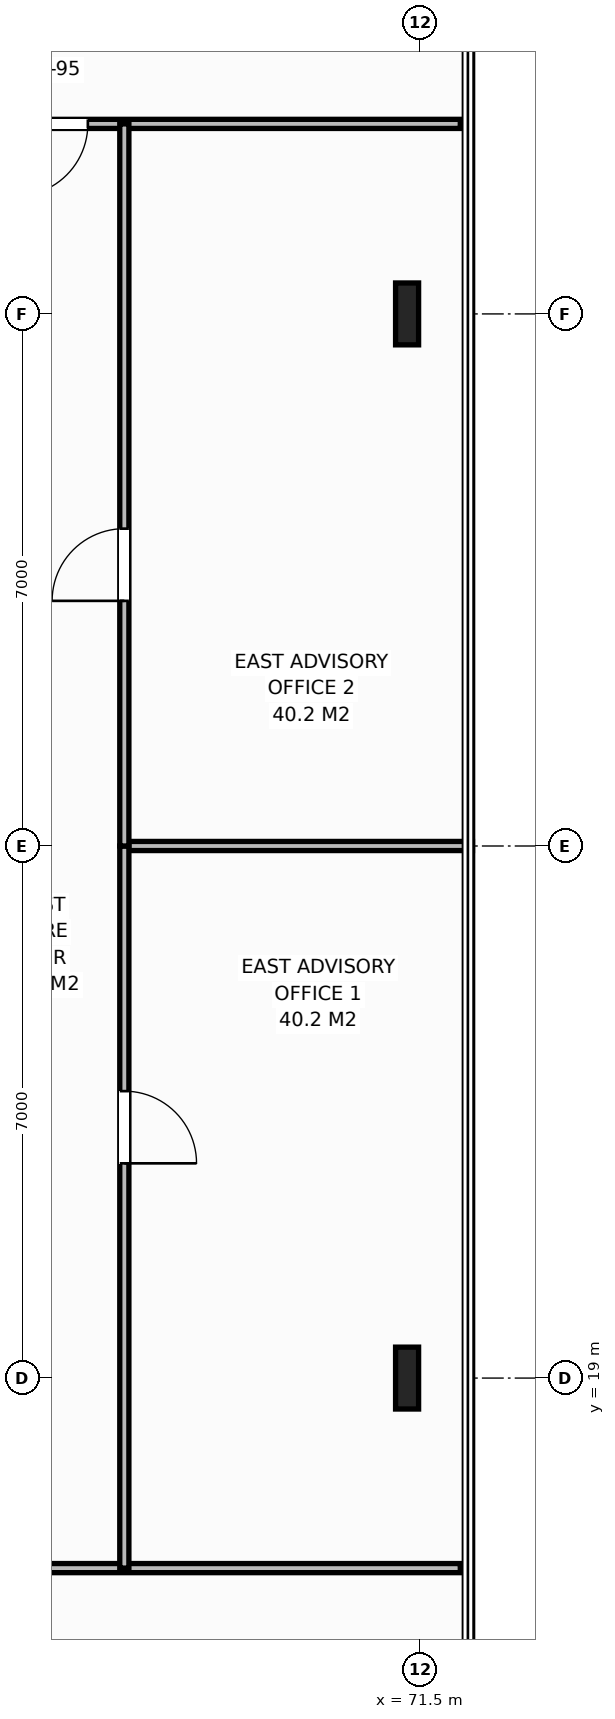
"""IFC4 building model, lengths in metres.
Left out: names, types, materials, properties, quantities, classifications, styles, units other than length and angle.
Written with IfcOpenShell. Run it as: python <this file> out.ifc"""

import sys

from ifc_helpers import new_model, si_unit, direction, frame, frame_2d, origin, origin_2d, place, context, subcontext, project, spatial, rectangle, i_section, extrude, element, fill, save


model = new_model("IFC4")
c1 = context("Model", 3, precision=1e-05, world=origin(), true_north=direction((0.0, 1.0)))
c2 = subcontext(c1, "Body", "Model", "MODEL_VIEW")
j1 = project(units=[si_unit("LENGTHUNIT", "METRE"), si_unit("PLANEANGLEUNIT", "RADIAN")], contexts=[c1])
p1 = place(None, origin())
s1 = spatial("IfcSite", under=j1, at=p1, CompositionType="ELEMENT")
p2 = place(p1, origin())
s2 = spatial("IfcBuilding", under=s1, at=p2, CompositionType="ELEMENT")
p3 = place(p2, frame((0.0, 0.0, 202.4)))
s3 = spatial("IfcBuildingStorey", under=s2, at=p3, CompositionType="ELEMENT", Elevation=202.4)
for number, where, z_axis, x_axis in (
    (1, (71.32, 19.0, 0.0), (0.0, 0.0, 1.0), (1.0, 0.0, 0.0)),
    (2, (71.32, 33.0, 0.0), (0.0, 0.0, 1.0), (1.0, 0.0, 0.0)),
):
    element("IfcColumn", number, at=place(p3, frame(where, z_axis=z_axis, x_axis=x_axis)), inside=s3, PredefinedType="COLUMN", context=c2, shape_type="SweptSolid", body=[
        extrude(i_section(OverallWidth=0.303, OverallDepth=0.814, WebThickness=0.021, FlangeThickness=0.04, at=origin_2d()), origin(), (0.0, 0.0, 1.0), 3.8),
    ])
p4 = place(p3, frame((64.86, 35.5, 0.0), z_axis=(0.0, 0.0, 1.0), x_axis=(1.0, 0.0, 0.0)))
e3 = element("IfcWall", 3, at=p4, inside=s3, PredefinedType="PARTITIONING", context=c2, shape_type="SweptSolid", body=[
    extrude(rectangle(XDim=7.16, YDim=0.12, at=frame_2d((3.58, 0.0))), origin(), (0.0, 0.0, 1.0), 3.58),
])
p5 = place(p4, frame((1.31, 0.0, 0.0)))
e4 = element("IfcOpeningElement", 4, at=p5, cuts=e3, PredefinedType="OPENING", context=c2, shape_type="SweptSolid", body=[
    extrude(rectangle(XDim=0.95, YDim=2.15, at=frame_2d((0.475, 1.075))), frame((0.0, 0.07, 0.0), z_axis=(0.0, -1.0, 0.0), x_axis=(1.0, 0.0, 0.0)), (0.0, 0.0, 1.0), 0.14),
])
p6 = place(p3, frame((58.377, 16.5, 0.0), z_axis=(0.0, 0.0, 1.0), x_axis=(1.0, 0.0, 0.0)))
e5 = element("IfcWall", 5, at=p6, inside=s3, PredefinedType="PARTITIONING", context=c2, shape_type="SweptSolid", body=[
    extrude(rectangle(XDim=13.643, YDim=0.12, at=frame_2d((6.822, 0.0))), origin(), (0.0, 0.0, 1.0), 3.58),
])
p7 = place(p6, frame((4.137, 0.0, 0.0)))
e6 = element("IfcOpeningElement", 6, at=p7, cuts=e5, PredefinedType="OPENING", context=c2, shape_type="SweptSolid", body=[
    extrude(rectangle(XDim=0.95, YDim=2.15, at=frame_2d((0.475, 1.075))), frame((0.0, 0.07, 0.0), z_axis=(0.0, -1.0, 0.0), x_axis=(1.0, 0.0, 0.0)), (0.0, 0.0, 1.0), 0.14),
])
p8 = place(p3, frame((67.6, 26.0, 0.0), z_axis=(0.0, 0.0, 1.0), x_axis=(1.0, 0.0, 0.0)))
e7 = element("IfcWall", 7, at=p8, inside=s3, PredefinedType="PARTITIONING", context=c2, shape_type="SweptSolid", body=[
    extrude(rectangle(XDim=4.58, YDim=0.12, at=frame_2d((2.29, 0.0))), origin(), (0.0, 0.0, 1.0), 3.58),
])
p9 = place(p3, frame((67.6, 16.5, 0.0), z_axis=(0.0, 0.0, 1.0), x_axis=(0.0, 1.0, 0.0)))
e8 = element("IfcWall", 8, at=p9, inside=s3, PredefinedType="PARTITIONING", context=c2, shape_type="SweptSolid", body=[
    extrude(rectangle(XDim=9.5, YDim=0.12, at=frame_2d((4.75, 0.0))), origin(), (0.0, 0.0, 1.0), 3.58),
])
p10 = place(p9, frame((5.325, 0.0, 0.0)))
e9 = element("IfcOpeningElement", 9, at=p10, cuts=e8, PredefinedType="OPENING", context=c2, shape_type="SweptSolid", body=[
    extrude(rectangle(XDim=0.95, YDim=2.15, at=frame_2d((0.475, 1.075))), frame((0.0, 0.07, 0.0), z_axis=(0.0, -1.0, 0.0), x_axis=(1.0, 0.0, 0.0)), (0.0, 0.0, 1.0), 0.14),
])
p11 = place(p3, frame((67.6, 26.0, 0.0), z_axis=(0.0, 0.0, 1.0), x_axis=(0.0, 1.0, 0.0)))
e10 = element("IfcWall", 10, at=p11, inside=s3, PredefinedType="PARTITIONING", context=c2, shape_type="SweptSolid", body=[
    extrude(rectangle(XDim=9.5, YDim=0.12, at=frame_2d((4.75, 0.0))), origin(), (0.0, 0.0, 1.0), 3.58),
])
p12 = place(p11, frame((3.225, 0.0, 0.0)))
e11 = element("IfcOpeningElement", 11, at=p12, cuts=e10, PredefinedType="OPENING", context=c2, shape_type="SweptSolid", body=[
    extrude(rectangle(XDim=0.95, YDim=2.15, at=frame_2d((0.475, 1.075))), frame((0.0, 0.07, 0.0), z_axis=(0.0, -1.0, 0.0), x_axis=(1.0, 0.0, 0.0)), (0.0, 0.0, 1.0), 0.14),
])
p13 = place(p5, origin())
e12 = element("IfcDoor", 12, at=p13, inside=s3, OperationType="SINGLE_SWING_RIGHT", PredefinedType="DOOR", context=c2, shape_type="SweptSolid", body=[
    extrude(rectangle(XDim=0.95, YDim=2.15, at=frame_2d((0.475, 1.075))), frame((0.0, 0.025, 0.0), z_axis=(0.0, -1.0, 0.0), x_axis=(1.0, 0.0, 0.0)), (0.0, 0.0, 1.0), 0.05),
])
fill(e4, e12)
p14 = place(p10, origin())
e13 = element("IfcDoor", 13, at=p14, inside=s3, OperationType="SINGLE_SWING_RIGHT", PredefinedType="DOOR", context=c2, shape_type="SweptSolid", body=[
    extrude(rectangle(XDim=0.95, YDim=2.15, at=frame_2d((0.475, 1.075))), frame((0.0, 0.025, 0.0), z_axis=(0.0, -1.0, 0.0), x_axis=(1.0, 0.0, 0.0)), (0.0, 0.0, 1.0), 0.05),
])
fill(e9, e13)
p15 = place(p12, origin())
e14 = element("IfcDoor", 14, at=p15, inside=s3, OperationType="SINGLE_SWING_LEFT", PredefinedType="DOOR", context=c2, shape_type="SweptSolid", body=[
    extrude(rectangle(XDim=0.95, YDim=2.15, at=frame_2d((0.475, 1.075))), frame((0.0, 0.025, 0.0), z_axis=(0.0, -1.0, 0.0), x_axis=(1.0, 0.0, 0.0)), (0.0, 0.0, 1.0), 0.05),
])
fill(e11, e14)
save(model, sys.argv[1])
